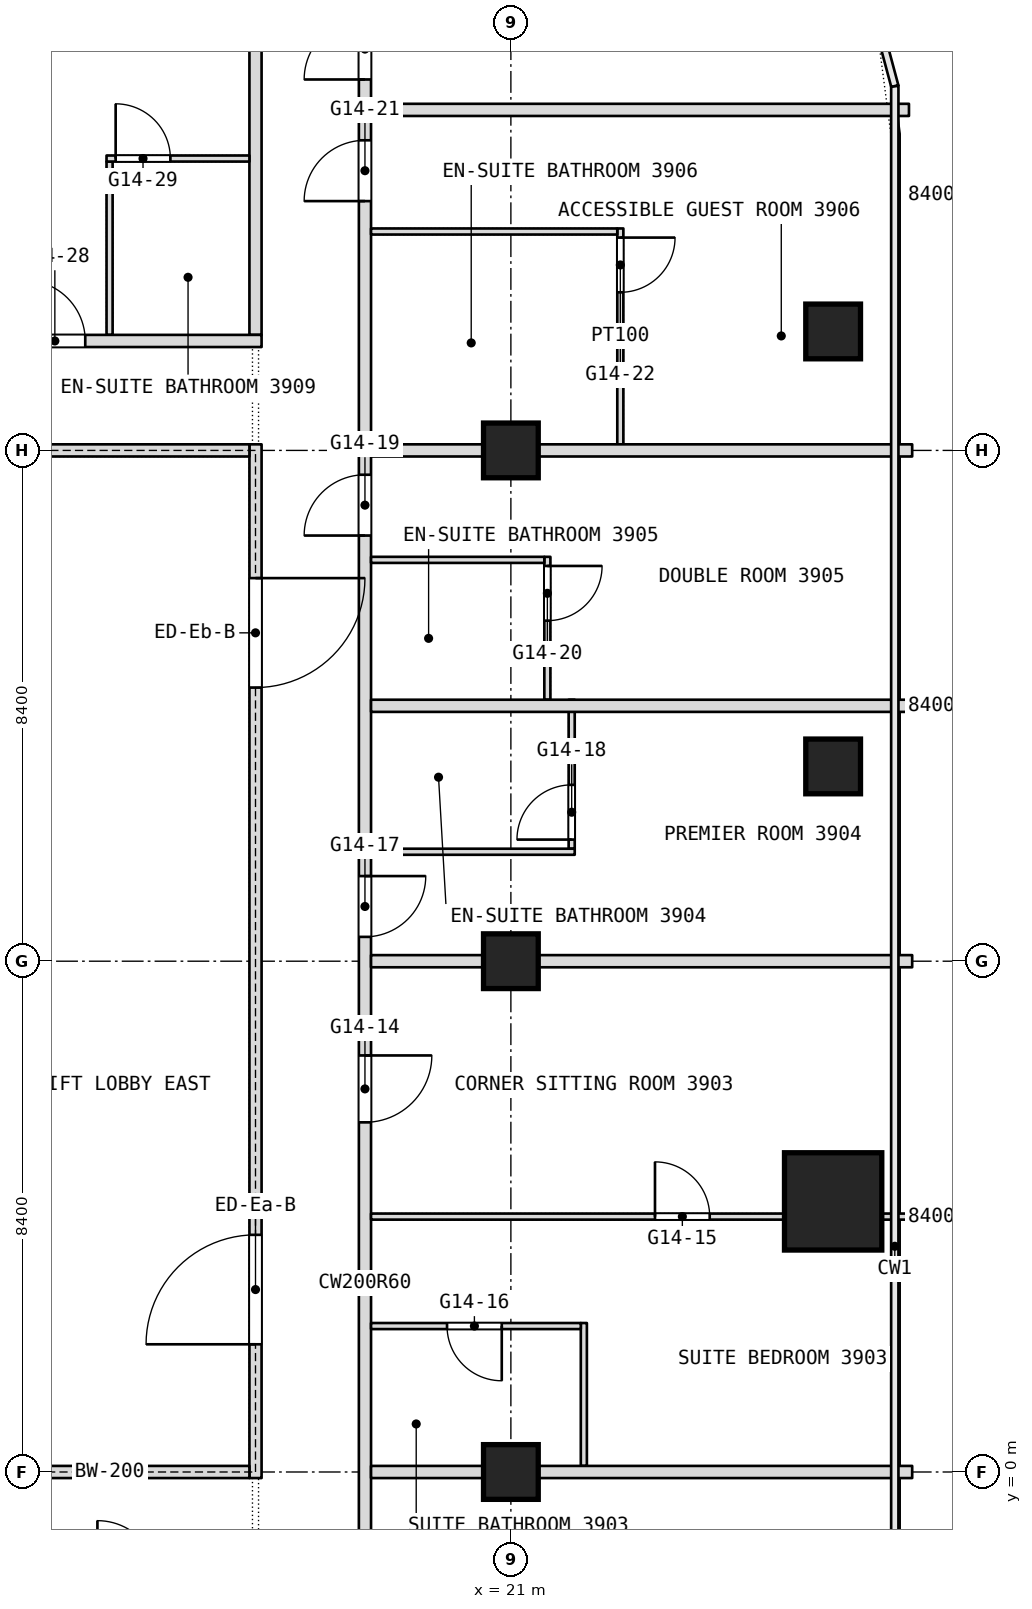
"""IFC4 building model, lengths in metres.
Left out: names, types, materials, properties, quantities, classifications, styles, units other than length and angle.
Written with IfcOpenShell. Run it as: python <this file> out.ifc"""

import sys

from ifc_helpers import new_model, si_unit, direction, frame, frame_2d, origin, origin_2d, place, context, subcontext, project, spatial, rectangle, extrude, element, fill, save


model = new_model("IFC4")
c1 = context("Model", 3, precision=1e-05, world=origin(), true_north=direction((0.0, 1.0)))
c2 = subcontext(c1, "Body", "Model", "MODEL_VIEW")
j1 = project(units=[si_unit("LENGTHUNIT", "METRE"), si_unit("PLANEANGLEUNIT", "RADIAN")], contexts=[c1])
p1 = place(None, origin())
s1 = spatial("IfcSite", under=j1, at=p1, CompositionType="ELEMENT")
p2 = place(p1, origin())
s2 = spatial("IfcBuilding", under=s1, at=p2, CompositionType="ELEMENT")
p3 = place(p2, frame((0.0, 0.0, 166.1)))
s3 = spatial("IfcBuildingStorey", under=s2, at=p3, CompositionType="ELEMENT", Elevation=166.1)
p4 = place(p3, frame((26.3, 4.45, 0.0), z_axis=(0.0, 0.0, 1.0), x_axis=(1.0, 0.0, 0.0)))
e1 = element("IfcColumn", 1, at=p4, inside=s3, PredefinedType="COLUMN", context=c2, shape_type="SweptSolid", body=[
    extrude(rectangle(XDim=1.6, YDim=1.6, at=origin_2d()), origin(), (0.0, 0.0, 1.0), 3.6),
])
for number, where, z_axis, x_axis in (
    (2, (21.0, 0.0, 0.0), (0.0, 0.0, 1.0), (1.0, 0.0, 0.0)),
    (3, (21.0, 8.4, 0.0), (0.0, 0.0, 1.0), (1.0, 0.0, 0.0)),
    (4, (21.0, 16.8, 0.0), (0.0, 0.0, 1.0), (1.0, 0.0, 0.0)),
    (5, (26.3, 18.756, 0.0), (0.0, 0.0, 1.0), (1.0, 0.0, 0.0)),
    (6, (26.3, 11.603, 0.0), (0.0, 0.0, 1.0), (1.0, 0.0, 0.0)),
):
    element("IfcColumn", number, at=place(p3, frame(where, z_axis=z_axis, x_axis=x_axis)), inside=s3, PredefinedType="COLUMN", context=c2, shape_type="SweptSolid", body=[
        extrude(rectangle(XDim=0.9, YDim=0.9, at=origin_2d()), origin(), (0.0, 0.0, 1.0), 3.6),
    ])
p5 = place(p3, frame((22.8, 16.9, 0.0), z_axis=(0.0, 0.0, 1.0), x_axis=(0.0, 1.0, 0.0)))
e7 = element("IfcWall", 7, at=p5, inside=s3, PredefinedType="PARTITIONING", context=c2, shape_type="SweptSolid", body=[
    extrude(rectangle(XDim=3.55, YDim=0.1, at=frame_2d((1.775, 0.0))), origin(), (0.0, 0.0, 1.0), 3.3),
])
p6 = place(p5, frame((2.5, 0.0, 0.0)))
e8 = element("IfcOpeningElement", 8, at=p6, cuts=e7, PredefinedType="OPENING", context=c2, shape_type="SweptSolid", body=[
    extrude(rectangle(XDim=0.9, YDim=2.1, at=frame_2d((0.45, 1.05))), frame((0.0, 0.05, 0.0), z_axis=(0.0, -1.0, 0.0), x_axis=(1.0, 0.0, 0.0)), (0.0, 0.0, 1.0), 0.1),
])
p7 = place(p3, frame((22.2, 0.1, 0.0), z_axis=(0.0, 0.0, 1.0), x_axis=(0.0, 1.0, 0.0)))
e9 = element("IfcWall", 9, at=p7, inside=s3, PredefinedType="PARTITIONING", context=c2, shape_type="SweptSolid", body=[
    extrude(rectangle(XDim=2.35, YDim=0.1, at=frame_2d((1.175, 0.0))), origin(), (0.0, 0.0, 1.0), 3.3),
])
p8 = place(p3, frame((22.0, 10.25, 0.0), z_axis=(0.0, 0.0, 1.0), x_axis=(0.0, 1.0, 0.0)))
e10 = element("IfcWall", 10, at=p8, inside=s3, PredefinedType="PARTITIONING", context=c2, shape_type="SweptSolid", body=[
    extrude(rectangle(XDim=2.45, YDim=0.1, at=frame_2d((1.225, 0.0))), origin(), (0.0, 0.0, 1.0), 3.3),
])
p9 = place(p8, frame((0.15, 0.0, 0.0)))
e11 = element("IfcOpeningElement", 11, at=p9, cuts=e10, PredefinedType="OPENING", context=c2, shape_type="SweptSolid", body=[
    extrude(rectangle(XDim=0.9, YDim=2.1, at=frame_2d((0.45, 1.05))), frame((0.0, 0.05, 0.0), z_axis=(0.0, -1.0, 0.0), x_axis=(1.0, 0.0, 0.0)), (0.0, 0.0, 1.0), 0.1),
])
p10 = place(p3, frame((21.6, 12.7, 0.0), z_axis=(0.0, 0.0, 1.0), x_axis=(0.0, 1.0, 0.0)))
e12 = element("IfcWall", 12, at=p10, inside=s3, PredefinedType="PARTITIONING", context=c2, shape_type="SweptSolid", body=[
    extrude(rectangle(XDim=2.35, YDim=0.1, at=frame_2d((1.175, 0.0))), origin(), (0.0, 0.0, 1.0), 3.3),
])
p11 = place(p10, frame((1.3, 0.0, 0.0)))
e13 = element("IfcOpeningElement", 13, at=p11, cuts=e12, PredefinedType="OPENING", context=c2, shape_type="SweptSolid", body=[
    extrude(rectangle(XDim=0.9, YDim=2.1, at=frame_2d((0.45, 1.05))), frame((0.0, 0.05, 0.0), z_axis=(0.0, -1.0, 0.0), x_axis=(1.0, 0.0, 0.0)), (0.0, 0.0, 1.0), 0.1),
])
p12 = place(p3, frame((18.6, -21.708, 0.0), z_axis=(0.0, 0.0, 1.0), x_axis=(0.0, 1.0, 0.0)))
e14 = element("IfcWall", 14, at=p12, inside=s3, PredefinedType="PARTITIONING", context=c2, shape_type="SweptSolid", body=[
    extrude(rectangle(XDim=49.648, YDim=0.2, at=frame_2d((24.824, 0.0))), origin(), (0.0, 0.0, 1.0), 3.3),
])
p13 = place(p12, frame((2.204, 0.0, 0.0)))
e15 = element("IfcOpeningElement", 15, at=p13, cuts=e14, PredefinedType="OPENING", context=c2, shape_type="SweptSolid", body=[
    extrude(rectangle(XDim=0.9, YDim=2.1, at=frame_2d((0.45, 1.05))), frame((0.0, 0.1, 0.0), z_axis=(0.0, -1.0, 0.0), x_axis=(1.0, 0.0, 0.0)), (0.0, 0.0, 1.0), 0.2),
])
p14 = place(p12, frame((8.608, 0.0, 0.0)))
e16 = element("IfcOpeningElement", 16, at=p14, cuts=e14, PredefinedType="OPENING", context=c2, shape_type="SweptSolid", body=[
    extrude(rectangle(XDim=1.1, YDim=2.1, at=frame_2d((0.55, 1.05))), frame((0.0, 0.1, 0.0), z_axis=(0.0, -1.0, 0.0), x_axis=(1.0, 0.0, 0.0)), (0.0, 0.0, 1.0), 0.2),
])
p15 = place(p12, frame((16.608, 0.0, 0.0)))
e17 = element("IfcOpeningElement", 17, at=p15, cuts=e14, PredefinedType="OPENING", context=c2, shape_type="SweptSolid", body=[
    extrude(rectangle(XDim=1.8, YDim=2.1, at=frame_2d((0.9, 1.05))), frame((0.0, 0.1, 0.0), z_axis=(0.0, -1.0, 0.0), x_axis=(1.0, 0.0, 0.0)), (0.0, 0.0, 1.0), 0.2),
])
p16 = place(p12, frame((27.458, 0.0, 0.0)))
e18 = element("IfcOpeningElement", 18, at=p16, cuts=e14, PredefinedType="OPENING", context=c2, shape_type="SweptSolid", body=[
    extrude(rectangle(XDim=1.1, YDim=2.1, at=frame_2d((0.55, 1.05))), frame((0.0, 0.1, 0.0), z_axis=(0.0, -1.0, 0.0), x_axis=(1.0, 0.0, 0.0)), (0.0, 0.0, 1.0), 0.2),
])
p17 = place(p12, frame((30.508, 0.0, 0.0)))
e19 = element("IfcOpeningElement", 19, at=p17, cuts=e14, PredefinedType="OPENING", context=c2, shape_type="SweptSolid", body=[
    extrude(rectangle(XDim=1.0, YDim=2.1, at=frame_2d((0.5, 1.05))), frame((0.0, 0.1, 0.0), z_axis=(0.0, -1.0, 0.0), x_axis=(1.0, 0.0, 0.0)), (0.0, 0.0, 1.0), 0.2),
])
p18 = place(p12, frame((37.108, 0.0, 0.0)))
e20 = element("IfcOpeningElement", 20, at=p18, cuts=e14, PredefinedType="OPENING", context=c2, shape_type="SweptSolid", body=[
    extrude(rectangle(XDim=1.0, YDim=2.1, at=frame_2d((0.5, 1.05))), frame((0.0, 0.1, 0.0), z_axis=(0.0, -1.0, 0.0), x_axis=(1.0, 0.0, 0.0)), (0.0, 0.0, 1.0), 0.2),
])
p19 = place(p12, frame((42.608, 0.0, 0.0)))
e21 = element("IfcOpeningElement", 21, at=p19, cuts=e14, PredefinedType="OPENING", context=c2, shape_type="SweptSolid", body=[
    extrude(rectangle(XDim=1.0, YDim=2.1, at=frame_2d((0.5, 1.05))), frame((0.0, 0.1, 0.0), z_axis=(0.0, -1.0, 0.0), x_axis=(1.0, 0.0, 0.0)), (0.0, 0.0, 1.0), 0.2),
])
p20 = place(p12, frame((44.608, 0.0, 0.0)))
e22 = element("IfcOpeningElement", 22, at=p20, cuts=e14, PredefinedType="OPENING", context=c2, shape_type="SweptSolid", body=[
    extrude(rectangle(XDim=1.0, YDim=2.1, at=frame_2d((0.5, 1.05))), frame((0.0, 0.1, 0.0), z_axis=(0.0, -1.0, 0.0), x_axis=(1.0, 0.0, 0.0)), (0.0, 0.0, 1.0), 0.2),
])
p21 = place(p3, frame((16.8, 18.7, 0.0), z_axis=(0.0, 0.0, 1.0), x_axis=(0.0, 1.0, 0.0)))
e23 = element("IfcWall", 23, at=p21, inside=s3, PredefinedType="PARTITIONING", context=c2, shape_type="SweptSolid", body=[
    extrude(rectangle(XDim=9.24, YDim=0.2, at=frame_2d((4.62, 0.0))), origin(), (0.0, 0.0, 1.0), 3.3),
])
p22 = place(p3, frame((14.4, 18.7, 0.0), z_axis=(0.0, 0.0, 1.0), x_axis=(0.0, 1.0, 0.0)))
e24 = element("IfcWall", 24, at=p22, inside=s3, PredefinedType="PARTITIONING", context=c2, shape_type="SweptSolid", body=[
    extrude(rectangle(XDim=2.85, YDim=0.1, at=frame_2d((1.425, 0.0))), origin(), (0.0, 0.0, 1.0), 3.3),
])
p23 = place(p3, frame((18.7, 0.0, 0.0), z_axis=(0.0, 0.0, 1.0), x_axis=(1.0, 0.0, 0.0)))
e25 = element("IfcWall", 25, at=p23, inside=s3, PredefinedType="PARTITIONING", context=c2, shape_type="SweptSolid", body=[
    extrude(rectangle(XDim=8.9, YDim=0.2, at=frame_2d((4.45, 0.0))), origin(), (0.0, 0.0, 1.0), 2.85),
])
p24 = place(p3, frame((18.7, 2.4, 0.0), z_axis=(0.0, 0.0, 1.0), x_axis=(1.0, 0.0, 0.0)))
e26 = element("IfcWall", 26, at=p24, inside=s3, PredefinedType="PARTITIONING", context=c2, shape_type="SweptSolid", body=[
    extrude(rectangle(XDim=3.45, YDim=0.1, at=frame_2d((1.725, 0.0))), origin(), (0.0, 0.0, 1.0), 3.3),
])
p25 = place(p24, frame((1.25, 0.0, 0.0)))
e27 = element("IfcOpeningElement", 27, at=p25, cuts=e26, PredefinedType="OPENING", context=c2, shape_type="SweptSolid", body=[
    extrude(rectangle(XDim=0.9, YDim=2.1, at=frame_2d((0.45, 1.05))), frame((0.0, 0.05, 0.0), z_axis=(0.0, -1.0, 0.0), x_axis=(1.0, 0.0, 0.0)), (0.0, 0.0, 1.0), 0.1),
])
p26 = place(p3, frame((18.7, 4.2, 0.0), z_axis=(0.0, 0.0, 1.0), x_axis=(1.0, 0.0, 0.0)))
e28 = element("IfcWall", 28, at=p26, inside=s3, PredefinedType="PARTITIONING", context=c2, shape_type="SweptSolid", body=[
    extrude(rectangle(XDim=6.8, YDim=0.1, at=frame_2d((3.4, 0.0))), origin(), (0.0, 0.0, 1.0), 3.3),
])
p27 = place(p26, frame((4.67, 0.0, 0.0)))
e29 = element("IfcOpeningElement", 29, at=p27, cuts=e28, PredefinedType="OPENING", context=c2, shape_type="SweptSolid", body=[
    extrude(rectangle(XDim=0.9, YDim=2.1, at=frame_2d((0.45, 1.05))), frame((0.0, 0.05, 0.0), z_axis=(0.0, -1.0, 0.0), x_axis=(1.0, 0.0, 0.0)), (0.0, 0.0, 1.0), 0.1),
])
p28 = place(p3, frame((27.1, 4.2, 0.0), z_axis=(0.0, 0.0, 1.0), x_axis=(1.0, 0.0, 0.0)))
e30 = element("IfcWall", 30, at=p28, inside=s3, PredefinedType="PARTITIONING", context=c2, shape_type="SweptSolid", body=[
    extrude(rectangle(XDim=0.5, YDim=0.1, at=frame_2d((0.25, 0.0))), origin(), (0.0, 0.0, 1.0), 3.3),
])
p29 = place(p3, frame((18.7, 8.4, 0.0), z_axis=(0.0, 0.0, 1.0), x_axis=(1.0, 0.0, 0.0)))
e31 = element("IfcWall", 31, at=p29, inside=s3, PredefinedType="PARTITIONING", context=c2, shape_type="SweptSolid", body=[
    extrude(rectangle(XDim=8.9, YDim=0.2, at=frame_2d((4.45, 0.0))), origin(), (0.0, 0.0, 1.0), 2.85),
])
p30 = place(p3, frame((18.7, 10.2, 0.0), z_axis=(0.0, 0.0, 1.0), x_axis=(1.0, 0.0, 0.0)))
e32 = element("IfcWall", 32, at=p30, inside=s3, PredefinedType="PARTITIONING", context=c2, shape_type="SweptSolid", body=[
    extrude(rectangle(XDim=3.35, YDim=0.1, at=frame_2d((1.675, 0.0))), origin(), (0.0, 0.0, 1.0), 3.3),
])
p31 = place(p3, frame((18.7, 12.6, 0.0), z_axis=(0.0, 0.0, 1.0), x_axis=(1.0, 0.0, 0.0)))
e33 = element("IfcWall", 33, at=p31, inside=s3, PredefinedType="PARTITIONING", context=c2, shape_type="SweptSolid", body=[
    extrude(rectangle(XDim=8.9, YDim=0.2, at=frame_2d((4.45, 0.0))), origin(), (0.0, 0.0, 1.0), 3.3),
])
p32 = place(p3, frame((18.7, 15.0, 0.0), z_axis=(0.0, 0.0, 1.0), x_axis=(1.0, 0.0, 0.0)))
e34 = element("IfcWall", 34, at=p32, inside=s3, PredefinedType="PARTITIONING", context=c2, shape_type="SweptSolid", body=[
    extrude(rectangle(XDim=2.85, YDim=0.1, at=frame_2d((1.425, 0.0))), origin(), (0.0, 0.0, 1.0), 3.3),
])
p33 = place(p3, frame((18.7, 16.8, 0.0), z_axis=(0.0, 0.0, 1.0), x_axis=(1.0, 0.0, 0.0)))
e35 = element("IfcWall", 35, at=p33, inside=s3, PredefinedType="PARTITIONING", context=c2, shape_type="SweptSolid", body=[
    extrude(rectangle(XDim=8.9, YDim=0.2, at=frame_2d((4.45, 0.0))), origin(), (0.0, 0.0, 1.0), 2.85),
])
p34 = place(p3, frame((10.7, 18.6, 0.0), z_axis=(0.0, 0.0, 1.0), x_axis=(1.0, 0.0, 0.0)))
e36 = element("IfcWall", 36, at=p34, inside=s3, PredefinedType="PARTITIONING", context=c2, shape_type="SweptSolid", body=[
    extrude(rectangle(XDim=6.2, YDim=0.2, at=frame_2d((3.1, 0.0))), origin(), (0.0, 0.0, 1.0), 3.3),
])
p35 = place(p34, frame((2.3, 0.0, 0.0)))
e37 = element("IfcOpeningElement", 37, at=p35, cuts=e36, PredefinedType="OPENING", context=c2, shape_type="SweptSolid", body=[
    extrude(rectangle(XDim=1.0, YDim=2.1, at=frame_2d((0.5, 1.05))), frame((0.0, 0.1, 0.0), z_axis=(0.0, -1.0, 0.0), x_axis=(1.0, 0.0, 0.0)), (0.0, 0.0, 1.0), 0.2),
])
p36 = place(p3, frame((18.7, 20.4, 0.0), z_axis=(0.0, 0.0, 1.0), x_axis=(1.0, 0.0, 0.0)))
e38 = element("IfcWall", 38, at=p36, inside=s3, PredefinedType="PARTITIONING", context=c2, shape_type="SweptSolid", body=[
    extrude(rectangle(XDim=4.05, YDim=0.1, at=frame_2d((2.025, 0.0))), origin(), (0.0, 0.0, 1.0), 3.3),
])
p37 = place(p3, frame((14.35, 21.6, 0.0), z_axis=(0.0, 0.0, 1.0), x_axis=(1.0, 0.0, 0.0)))
e39 = element("IfcWall", 39, at=p37, inside=s3, PredefinedType="PARTITIONING", context=c2, shape_type="SweptSolid", body=[
    extrude(rectangle(XDim=2.35, YDim=0.1, at=frame_2d((1.175, 0.0))), origin(), (0.0, 0.0, 1.0), 3.3),
])
p38 = place(p37, frame((0.15, 0.0, 0.0)))
e40 = element("IfcOpeningElement", 40, at=p38, cuts=e39, PredefinedType="OPENING", context=c2, shape_type="SweptSolid", body=[
    extrude(rectangle(XDim=0.9, YDim=2.1, at=frame_2d((0.45, 1.05))), frame((0.0, 0.05, 0.0), z_axis=(0.0, -1.0, 0.0), x_axis=(1.0, 0.0, 0.0)), (0.0, 0.0, 1.0), 0.1),
])
p39 = place(p3, frame((18.7, 22.4, 0.0), z_axis=(0.0, 0.0, 1.0), x_axis=(1.0, 0.0, 0.0)))
e41 = element("IfcWall", 41, at=p39, inside=s3, PredefinedType="PARTITIONING", context=c2, shape_type="SweptSolid", body=[
    extrude(rectangle(XDim=8.847, YDim=0.2, at=frame_2d((4.424, 0.0))), origin(), (0.0, 0.0, 1.0), 3.3),
])
p40 = place(p3, frame((16.8, -0.1, 0.0), z_axis=(0.0, 0.0, 1.0), x_axis=(0.0, 1.0, 0.0)))
e42 = element("IfcWall", 42, at=p40, inside=s3, PredefinedType="PARTITIONING", context=c2, shape_type="SweptSolid", body=[
    extrude(rectangle(XDim=17.0, YDim=0.2, at=frame_2d((8.5, 0.0))), origin(), (0.0, 0.0, 1.0), 3.3),
])
p41 = place(p40, frame((2.2, 0.0, 0.0)))
e43 = element("IfcOpeningElement", 43, at=p41, cuts=e42, PredefinedType="OPENING", context=c2, shape_type="SweptSolid", body=[
    extrude(rectangle(XDim=1.8, YDim=2.1, at=frame_2d((0.9, 1.05))), frame((0.0, 0.1, 0.0), z_axis=(0.0, -1.0, 0.0), x_axis=(1.0, 0.0, 0.0)), (0.0, 0.0, 1.0), 0.2),
])
p42 = place(p40, frame((13.0, 0.0, 0.0)))
e44 = element("IfcOpeningElement", 44, at=p42, cuts=e42, PredefinedType="OPENING", context=c2, shape_type="SweptSolid", body=[
    extrude(rectangle(XDim=1.8, YDim=2.1, at=frame_2d((0.9, 1.05))), frame((0.0, 0.1, 0.0), z_axis=(0.0, -1.0, 0.0), x_axis=(1.0, 0.0, 0.0)), (0.0, 0.0, 1.0), 0.2),
])
for number, where, z_axis, x_axis in (
    (45, (12.1, 0.0, 0.0), (0.0, 0.0, 1.0), (1.0, 0.0, 0.0)),
    (46, (12.1, 16.8, 0.0), (0.0, 0.0, 1.0), (1.0, 0.0, 0.0)),
):
    element("IfcWall", number, at=place(p3, frame(where, z_axis=z_axis, x_axis=x_axis)), inside=s3, PredefinedType="PARTITIONING", context=c2, shape_type="SweptSolid", body=[
        extrude(rectangle(XDim=4.6, YDim=0.2, at=frame_2d((2.3, 0.0))), origin(), (0.0, 0.0, 1.0), 2.85),
    ])
p43 = place(p6, origin())
e47 = element("IfcDoor", 47, at=p43, inside=s3, OperationType="SINGLE_SWING_RIGHT", PredefinedType="DOOR", context=c2, shape_type="SweptSolid", body=[
    extrude(rectangle(XDim=0.9, YDim=2.1, at=frame_2d((0.45, 1.05))), frame((0.0, 0.025, 0.0), z_axis=(0.0, -1.0, 0.0), x_axis=(1.0, 0.0, 0.0)), (0.0, 0.0, 1.0), 0.05),
])
fill(e8, e47)
p44 = place(p9, origin())
e48 = element("IfcDoor", 48, at=p44, inside=s3, OperationType="SINGLE_SWING_LEFT", PredefinedType="DOOR", context=c2, shape_type="SweptSolid", body=[
    extrude(rectangle(XDim=0.9, YDim=2.1, at=frame_2d((0.45, 1.05))), frame((0.0, 0.025, 0.0), z_axis=(0.0, -1.0, 0.0), x_axis=(1.0, 0.0, 0.0)), (0.0, 0.0, 1.0), 0.05),
])
fill(e11, e48)
p45 = place(p11, origin())
e49 = element("IfcDoor", 49, at=p45, inside=s3, OperationType="SINGLE_SWING_RIGHT", PredefinedType="DOOR", context=c2, shape_type="SweptSolid", body=[
    extrude(rectangle(XDim=0.9, YDim=2.1, at=frame_2d((0.45, 1.05))), frame((0.0, 0.025, 0.0), z_axis=(0.0, -1.0, 0.0), x_axis=(1.0, 0.0, 0.0)), (0.0, 0.0, 1.0), 0.05),
])
fill(e13, e49)
p46 = place(p16, origin())
e50 = element("IfcDoor", 50, at=p46, inside=s3, OperationType="SINGLE_SWING_RIGHT", PredefinedType="DOOR", context=c2, shape_type="SweptSolid", body=[
    extrude(rectangle(XDim=1.1, YDim=2.1, at=frame_2d((0.55, 1.05))), frame((0.0, 0.025, 0.0), z_axis=(0.0, -1.0, 0.0), x_axis=(1.0, 0.0, 0.0)), (0.0, 0.0, 1.0), 0.05),
])
fill(e18, e50)
p47 = place(p17, origin())
e51 = element("IfcDoor", 51, at=p47, inside=s3, OperationType="SINGLE_SWING_LEFT", PredefinedType="DOOR", context=c2, shape_type="SweptSolid", body=[
    extrude(rectangle(XDim=1.0, YDim=2.1, at=frame_2d((0.5, 1.05))), frame((0.0, 0.025, 0.0), z_axis=(0.0, -1.0, 0.0), x_axis=(1.0, 0.0, 0.0)), (0.0, 0.0, 1.0), 0.05),
])
fill(e19, e51)
p48 = place(p18, origin())
e52 = element("IfcDoor", 52, at=p48, inside=s3, OperationType="SINGLE_SWING_LEFT", PredefinedType="DOOR", context=c2, shape_type="SweptSolid", body=[
    extrude(rectangle(XDim=1.0, YDim=2.1, at=frame_2d((0.5, 1.05))), frame((0.0, 0.025, 0.0), z_axis=(0.0, -1.0, 0.0), x_axis=(1.0, 0.0, 0.0)), (0.0, 0.0, 1.0), 0.05),
])
fill(e20, e52)
p49 = place(p19, origin())
e53 = element("IfcDoor", 53, at=p49, inside=s3, OperationType="SINGLE_SWING_LEFT", PredefinedType="DOOR", context=c2, shape_type="SweptSolid", body=[
    extrude(rectangle(XDim=1.0, YDim=2.1, at=frame_2d((0.5, 1.05))), frame((0.0, 0.025, 0.0), z_axis=(0.0, -1.0, 0.0), x_axis=(1.0, 0.0, 0.0)), (0.0, 0.0, 1.0), 0.05),
])
fill(e21, e53)
p50 = place(p20, origin())
e54 = element("IfcDoor", 54, at=p50, inside=s3, OperationType="SINGLE_SWING_LEFT", PredefinedType="DOOR", context=c2, shape_type="SweptSolid", body=[
    extrude(rectangle(XDim=1.0, YDim=2.1, at=frame_2d((0.5, 1.05))), frame((0.0, 0.025, 0.0), z_axis=(0.0, -1.0, 0.0), x_axis=(1.0, 0.0, 0.0)), (0.0, 0.0, 1.0), 0.05),
])
fill(e22, e54)
p51 = place(p25, origin())
e55 = element("IfcDoor", 55, at=p51, inside=s3, OperationType="SINGLE_SWING_RIGHT", PredefinedType="DOOR", context=c2, shape_type="SweptSolid", body=[
    extrude(rectangle(XDim=0.9, YDim=2.1, at=frame_2d((0.45, 1.05))), frame((0.0, 0.025, 0.0), z_axis=(0.0, -1.0, 0.0), x_axis=(1.0, 0.0, 0.0)), (0.0, 0.0, 1.0), 0.05),
])
fill(e27, e55)
p52 = place(p27, origin())
e56 = element("IfcDoor", 56, at=p52, inside=s3, OperationType="SINGLE_SWING_LEFT", PredefinedType="DOOR", context=c2, shape_type="SweptSolid", body=[
    extrude(rectangle(XDim=0.9, YDim=2.1, at=frame_2d((0.45, 1.05))), frame((0.0, 0.025, 0.0), z_axis=(0.0, -1.0, 0.0), x_axis=(1.0, 0.0, 0.0)), (0.0, 0.0, 1.0), 0.05),
])
fill(e29, e56)
p53 = place(p35, origin())
e57 = element("IfcDoor", 57, at=p53, inside=s3, OperationType="SINGLE_SWING_LEFT", PredefinedType="DOOR", context=c2, shape_type="SweptSolid", body=[
    extrude(rectangle(XDim=1.0, YDim=2.1, at=frame_2d((0.5, 1.05))), frame((0.0, 0.025, 0.0), z_axis=(0.0, -1.0, 0.0), x_axis=(1.0, 0.0, 0.0)), (0.0, 0.0, 1.0), 0.05),
])
fill(e37, e57)
p54 = place(p38, origin())
e58 = element("IfcDoor", 58, at=p54, inside=s3, OperationType="SINGLE_SWING_RIGHT", PredefinedType="DOOR", context=c2, shape_type="SweptSolid", body=[
    extrude(rectangle(XDim=0.9, YDim=2.1, at=frame_2d((0.45, 1.05))), frame((0.0, 0.025, 0.0), z_axis=(0.0, -1.0, 0.0), x_axis=(1.0, 0.0, 0.0)), (0.0, 0.0, 1.0), 0.05),
])
fill(e40, e58)
p55 = place(p41, origin())
e59 = element("IfcDoor", 59, at=p55, inside=s3, OperationType="DOUBLE_DOOR_SINGLE_SWING", PredefinedType="DOOR", context=c2, shape_type="SweptSolid", body=[
    extrude(rectangle(XDim=1.8, YDim=2.1, at=frame_2d((0.9, 1.05))), frame((0.0, 0.025, 0.0), z_axis=(0.0, -1.0, 0.0), x_axis=(1.0, 0.0, 0.0)), (0.0, 0.0, 1.0), 0.05),
])
fill(e43, e59)
p56 = place(p42, origin())
e60 = element("IfcDoor", 60, at=p56, inside=s3, OperationType="DOUBLE_DOOR_SINGLE_SWING", PredefinedType="DOOR", context=c2, shape_type="SweptSolid", body=[
    extrude(rectangle(XDim=1.8, YDim=2.1, at=frame_2d((0.9, 1.05))), frame((0.0, 0.025, 0.0), z_axis=(0.0, -1.0, 0.0), x_axis=(1.0, 0.0, 0.0)), (0.0, 0.0, 1.0), 0.05),
])
fill(e44, e60)
save(model, sys.argv[1])
